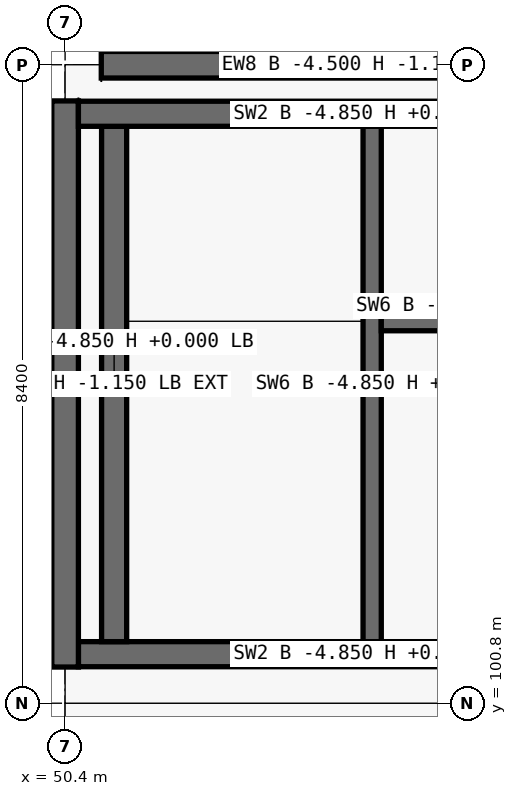
"""IFC4 building model, lengths in metres.
Left out: names, types, materials, properties, quantities, classifications, styles, units other than length and angle.
Written with IfcOpenShell. Run it as: python <this file> out.ifc"""

import sys

from ifc_helpers import new_model, si_unit, direction, frame, frame_2d, origin, origin_2d, place, context, subcontext, project, spatial, rectangle, extrude, element, fill, save


model = new_model("IFC4")
c1 = context("Model", 3, precision=1e-05, world=origin(), true_north=direction((0.0, 1.0)))
c2 = subcontext(c1, "Body", "Model", "MODEL_VIEW")
j1 = project(units=[si_unit("LENGTHUNIT", "METRE"), si_unit("PLANEANGLEUNIT", "RADIAN")], contexts=[c1])
p1 = place(None, origin())
s1 = spatial("IfcSite", under=j1, at=p1, CompositionType="ELEMENT")
p2 = place(p1, origin())
s2 = spatial("IfcBuilding", under=s1, at=p2, CompositionType="ELEMENT")
p3 = place(p2, frame((0.0, 0.0, -4.5)))
s3 = spatial("IfcBuildingStorey", under=s2, at=p3, CompositionType="ELEMENT", Elevation=-4.5)
for number, where, z_axis, x_axis in (
    (1, (50.4, 100.8, -0.35), (0.0, 0.0, 1.0), (1.0, 0.0, 0.0)),
    (2, (50.4, 109.2, -0.35), (0.0, 0.0, 1.0), (1.0, 0.0, 0.0)),
):
    element("IfcColumn", number, at=place(p3, frame(where, z_axis=z_axis, x_axis=x_axis)), inside=s3, PredefinedType="COLUMN", context=c2, shape_type="SweptSolid", body=[
        extrude(rectangle(XDim=0.95, YDim=0.95, at=origin_2d()), origin(), (0.0, 0.0, 1.0), 4.85),
    ])
p4 = place(p3, frame((50.4, 101.276, 0.0), z_axis=(0.0, 0.0, 1.0), x_axis=(0.0, 1.0, 0.0)))
e3 = element("IfcWall", 3, at=p4, inside=s3, PredefinedType="SOLIDWALL", context=c2, shape_type="SweptSolid", body=[
    extrude(rectangle(XDim=7.448, YDim=0.35, at=frame_2d((3.724, 0.0))), origin(), (0.0, 0.0, 1.0), 3.35),
])
p5 = place(p3, frame((50.876, 109.2, 0.0), z_axis=(0.0, 0.0, 1.0), x_axis=(1.0, 0.0, 0.0)))
e4 = element("IfcWall", 4, at=p5, inside=s3, PredefinedType="SOLIDWALL", context=c2, shape_type="SweptSolid", body=[
    extrude(rectangle(XDim=7.448, YDim=0.35, at=frame_2d((3.724, 0.0))), origin(), (0.0, 0.0, 1.0), 3.35),
])
p6 = place(p3, frame((58.32, 101.445, -0.35), z_axis=(0.0, 0.0, 1.0), x_axis=(-1.0, 0.0, 0.0)))
e5 = element("IfcWall", 5, at=p6, inside=s3, PredefinedType="SHEAR", context=c2, shape_type="SweptSolid", body=[
    extrude(rectangle(XDim=7.745, YDim=0.33, at=frame_2d((3.873, 0.0))), origin(), (0.0, 0.0, 1.0), 4.85),
])
p7 = place(p6, frame((1.28, 0.0, 0.35)))
e6 = element("IfcOpeningElement", 6, at=p7, cuts=e5, PredefinedType="OPENING", context=c2, shape_type="SweptSolid", body=[
    extrude(rectangle(XDim=1.5, YDim=2.15, at=frame_2d((0.75, 1.075))), frame((0.0, 0.165, 0.0), z_axis=(0.0, -1.0, 0.0), x_axis=(1.0, 0.0, 0.0)), (0.0, 0.0, 1.0), 0.33),
])
p8 = place(p3, frame((51.045, 101.61, -0.35), z_axis=(0.0, 0.0, 1.0), x_axis=(0.0, 1.0, 0.0)))
e7 = element("IfcWall", 7, at=p8, inside=s3, PredefinedType="SHEAR", context=c2, shape_type="SweptSolid", body=[
    extrude(rectangle(XDim=6.78, YDim=0.33, at=frame_2d((3.39, 0.0))), origin(), (0.0, 0.0, 1.0), 4.85),
])
p9 = place(p3, frame((50.575, 108.555, -0.35), z_axis=(0.0, 0.0, 1.0), x_axis=(1.0, 0.0, 0.0)))
e8 = element("IfcWall", 8, at=p9, inside=s3, PredefinedType="SHEAR", context=c2, shape_type="SweptSolid", body=[
    extrude(rectangle(XDim=7.745, YDim=0.33, at=frame_2d((3.873, 0.0))), origin(), (0.0, 0.0, 1.0), 4.85),
])
p10 = place(p3, frame((54.44, 101.61, -0.35), z_axis=(0.0, 0.0, 1.0), x_axis=(0.0, 1.0, 0.0)))
e9 = element("IfcWall", 9, at=p10, inside=s3, PredefinedType="SHEAR", context=c2, shape_type="SweptSolid", body=[
    extrude(rectangle(XDim=6.78, YDim=0.24, at=frame_2d((3.39, 0.0))), origin(), (0.0, 0.0, 1.0), 4.85),
])
p11 = place(p10, frame((0.12, 0.0, 0.35)))
e10 = element("IfcOpeningElement", 10, at=p11, cuts=e9, PredefinedType="OPENING", context=c2, shape_type="SweptSolid", body=[
    extrude(rectangle(XDim=1.0, YDim=2.15, at=frame_2d((0.5, 1.075))), frame((0.0, 0.12, 0.0), z_axis=(0.0, -1.0, 0.0), x_axis=(1.0, 0.0, 0.0)), (0.0, 0.0, 1.0), 0.24),
])
p12 = place(p3, frame((54.56, 105.82, -0.35), z_axis=(0.0, 0.0, 1.0), x_axis=(1.0, 0.0, 0.0)))
e11 = element("IfcWall", 11, at=p12, inside=s3, PredefinedType="SHEAR", context=c2, shape_type="SweptSolid", body=[
    extrude(rectangle(XDim=3.43, YDim=0.24, at=frame_2d((1.715, 0.0))), origin(), (0.0, 0.0, 1.0), 4.85),
])
p13 = place(p12, frame((1.115, 0.0, 0.35)))
e12 = element("IfcOpeningElement", 12, at=p13, cuts=e11, PredefinedType="OPENING", context=c2, shape_type="SweptSolid", body=[
    extrude(rectangle(XDim=1.2, YDim=2.2, at=frame_2d((0.6, 1.1))), frame((0.0, 0.12, 0.0), z_axis=(0.0, -1.0, 0.0), x_axis=(1.0, 0.0, 0.0)), (0.0, 0.0, 1.0), 0.24),
])
p14 = place(p11, origin())
e13 = element("IfcDoor", 13, at=p14, inside=s3, OperationType="SINGLE_SWING_RIGHT", PredefinedType="DOOR", context=c2, shape_type="SweptSolid", body=[
    extrude(rectangle(XDim=1.0, YDim=2.15, at=frame_2d((0.5, 1.075))), frame((0.0, 0.025, 0.0), z_axis=(0.0, -1.0, 0.0), x_axis=(1.0, 0.0, 0.0)), (0.0, 0.0, 1.0), 0.05),
])
fill(e10, e13)
save(model, sys.argv[1])
